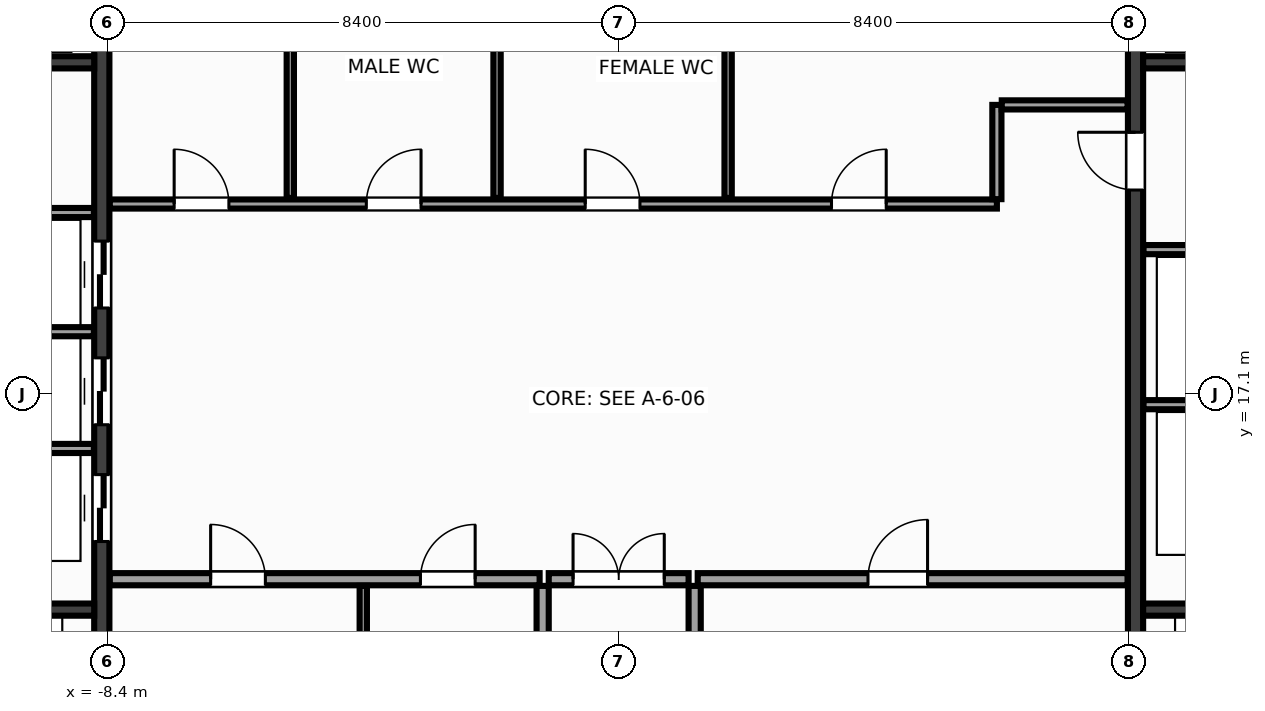
"""IFC4 building model, lengths in metres.
Left out: names, types, materials, properties, quantities, classifications, styles, units other than length and angle.
Written with IfcOpenShell. Run it as: python <this file> out.ifc"""

import sys

from ifc_helpers import new_model, si_unit, direction, frame, frame_2d, origin, place, context, subcontext, project, spatial, rectangle, extrude, source, transform, mapped, element, fill, save


model = new_model("IFC4")
c1 = context("Model", 3, precision=1e-05, world=origin(), true_north=direction((0.0, 1.0)))
c2 = subcontext(c1, "Body", "Model", "MODEL_VIEW")
j1 = project(units=[si_unit("LENGTHUNIT", "METRE"), si_unit("PLANEANGLEUNIT", "RADIAN")], contexts=[c1])
p1 = place(None, origin())
s1 = spatial("IfcSite", under=j1, at=p1, CompositionType="ELEMENT")
p2 = place(p1, origin())
s2 = spatial("IfcBuilding", under=s1, at=p2, CompositionType="ELEMENT")
p3 = place(p2, frame((0.0, 0.0, 232.4)))
s3 = spatial("IfcBuildingStorey", under=s2, at=p3, CompositionType="ELEMENT", Elevation=232.4)
m1 = source(origin(), c2, "Body", "SweptSolid", [
    extrude(rectangle(XDim=13.1, YDim=0.25, at=frame_2d((6.55, 0.0))), origin(), (0.0, 0.0, 1.0), 3.6),
])
p4 = place(p3, frame((-8.5, 10.45, 0.0), z_axis=(0.0, 0.0, 1.0), x_axis=(0.0, 1.0, 0.0)))
e1 = element("IfcWall", 1, at=p4, inside=s3, PredefinedType="SHEAR", context=c2, shape_type="MappedRepresentation", body=[
    mapped(m1, transform((0.0, 0.0, 0.0), x_axis=(1.0, 0.0, 0.0), y_axis=(0.0, 1.0, 0.0), z_axis=(0.0, 0.0, 1.0), scale=1.0)),
])
p5 = place(p4, frame((4.22, 0.0, 0.0)))
e2 = element("IfcOpeningElement", 2, at=p5, cuts=e1, PredefinedType="OPENING", context=c2, shape_type="SweptSolid", body=[
    extrude(rectangle(XDim=1.1, YDim=2.15, at=frame_2d((0.55, 1.075))), frame((0.0, 0.137, 0.0), z_axis=(0.0, -1.0, 0.0), x_axis=(1.0, 0.0, 0.0)), (0.0, 0.0, 1.0), 0.274),
])
p6 = place(p4, frame((6.14, 0.0, 0.0)))
e3 = element("IfcOpeningElement", 3, at=p6, cuts=e1, PredefinedType="OPENING", context=c2, shape_type="SweptSolid", body=[
    extrude(rectangle(XDim=1.1, YDim=2.15, at=frame_2d((0.55, 1.075))), frame((0.0, 0.137, 0.0), z_axis=(0.0, -1.0, 0.0), x_axis=(1.0, 0.0, 0.0)), (0.0, 0.0, 1.0), 0.274),
])
p7 = place(p4, frame((8.06, 0.0, 0.0)))
e4 = element("IfcOpeningElement", 4, at=p7, cuts=e1, PredefinedType="OPENING", context=c2, shape_type="SweptSolid", body=[
    extrude(rectangle(XDim=1.1, YDim=2.15, at=frame_2d((0.55, 1.075))), frame((0.0, 0.137, 0.0), z_axis=(0.0, -1.0, 0.0), x_axis=(1.0, 0.0, 0.0)), (0.0, 0.0, 1.0), 0.274),
])
p8 = place(p3, frame((8.5, 10.45, 0.0), z_axis=(0.0, 0.0, 1.0), x_axis=(0.0, 1.0, 0.0)))
e5 = element("IfcWall", 5, at=p8, inside=s3, PredefinedType="SHEAR", context=c2, shape_type="MappedRepresentation", body=[
    mapped(m1, transform((0.0, 0.0, 0.0), x_axis=(1.0, 0.0, 0.0), y_axis=(0.0, 1.0, 0.0), z_axis=(0.0, 0.0, 1.0), scale=1.0)),
])
p9 = place(p8, frame((10.0, 0.0, 0.0)))
e6 = element("IfcOpeningElement", 6, at=p9, cuts=e5, PredefinedType="OPENING", context=c2, shape_type="SweptSolid", body=[
    extrude(rectangle(XDim=0.95, YDim=2.15, at=frame_2d((0.475, 1.075))), frame((0.0, 0.137, 0.0), z_axis=(0.0, -1.0, 0.0), x_axis=(1.0, 0.0, 0.0)), (0.0, 0.0, 1.0), 0.274),
])
m2 = source(origin(), c2, "Body", "SweptSolid", [
    extrude(rectangle(XDim=2.825, YDim=0.2, at=frame_2d((1.413, 0.0))), origin(), (0.0, 0.0, 1.0), 3.6),
])
for number, where, z_axis, x_axis in (
    (7, (-11.45, 13.55, 0.0), (0.0, 0.0, 1.0), (1.0, 0.0, 0.0)),
    (8, (8.625, 13.55, 0.0), (0.0, 0.0, 1.0), (1.0, 0.0, 0.0)),
):
    element("IfcWall", number, at=place(p3, frame(where, z_axis=z_axis, x_axis=x_axis)), inside=s3, PredefinedType="SHEAR", context=c2, shape_type="MappedRepresentation", body=[
        mapped(m2, transform((0.0, 0.0, 0.0), x_axis=(1.0, 0.0, 0.0), y_axis=(0.0, 1.0, 0.0), z_axis=(0.0, 0.0, 1.0), scale=1.0)),
    ])
m3 = source(origin(), c2, "Body", "SweptSolid", [
    extrude(rectangle(XDim=3.02, YDim=0.2, at=frame_2d((1.51, 0.0))), origin(), (0.0, 0.0, 1.0), 3.6),
])
for number, where, z_axis, x_axis in (
    (9, (-11.645, 22.55, 0.0), (0.0, 0.0, 1.0), (1.0, 0.0, 0.0)),
    (10, (8.625, 22.55, 0.0), (0.0, 0.0, 1.0), (1.0, 0.0, 0.0)),
):
    element("IfcWall", number, at=place(p3, frame(where, z_axis=z_axis, x_axis=x_axis)), inside=s3, PredefinedType="SHEAR", context=c2, shape_type="MappedRepresentation", body=[
        mapped(m3, transform((0.0, 0.0, 0.0), x_axis=(1.0, 0.0, 0.0), y_axis=(0.0, 1.0, 0.0), z_axis=(0.0, 0.0, 1.0), scale=1.0)),
    ])
m4 = source(origin(), c2, "Body", "SweptSolid", [
    extrude(rectangle(XDim=3.01, YDim=0.15, at=frame_2d((1.505, 0.0))), origin(), (0.0, 0.0, 1.0), 3.37),
])
for number, where, z_axis, x_axis in (
    (11, (-11.64, 16.2, 0.0), (0.0, 0.0, 1.0), (1.0, 0.0, 0.0)),
    (12, (-11.64, 18.12, 0.0), (0.0, 0.0, 1.0), (1.0, 0.0, 0.0)),
    (13, (-11.64, 20.08, 0.0), (0.0, 0.0, 1.0), (1.0, 0.0, 0.0)),
    (14, (8.63, 16.92, 0.0), (0.0, 0.0, 1.0), (1.0, 0.0, 0.0)),
    (15, (8.63, 19.47, 0.0), (0.0, 0.0, 1.0), (1.0, 0.0, 0.0)),
):
    element("IfcWall", number, at=place(p3, frame(where, z_axis=z_axis, x_axis=x_axis)), inside=s3, PredefinedType="PARTITIONING", context=c2, shape_type="MappedRepresentation", body=[
        mapped(m4, transform((0.0, 0.0, 0.0), x_axis=(1.0, 0.0, 0.0), y_axis=(0.0, 1.0, 0.0), z_axis=(0.0, 0.0, 1.0), scale=1.0)),
    ])
m5 = source(origin(), c2, "Body", "SweptSolid", [
    extrude(rectangle(XDim=7.07, YDim=0.2, at=frame_2d((3.535, 0.0))), origin(), (0.0, 0.0, 1.0), 3.37),
])
p10 = place(p3, frame((-8.37, 14.05, 0.0), z_axis=(0.0, 0.0, 1.0), x_axis=(1.0, 0.0, 0.0)))
e16 = element("IfcWall", 16, at=p10, inside=s3, PredefinedType="PARTITIONING", context=c2, shape_type="MappedRepresentation", body=[
    mapped(m5, transform((0.0, 0.0, 0.0), x_axis=(1.0, 0.0, 0.0), y_axis=(0.0, 1.0, 0.0), z_axis=(0.0, 0.0, 1.0), scale=1.0)),
])
p11 = place(p10, frame((1.66, 0.0, 0.0)))
e17 = element("IfcOpeningElement", 17, at=p11, cuts=e16, PredefinedType="OPENING", context=c2, shape_type="SweptSolid", body=[
    extrude(rectangle(XDim=0.9, YDim=2.15, at=frame_2d((0.45, 1.075))), frame((0.0, 0.112, 0.0), z_axis=(0.0, -1.0, 0.0), x_axis=(1.0, 0.0, 0.0)), (0.0, 0.0, 1.0), 0.224),
])
p12 = place(p10, frame((5.11, 0.0, 0.0)))
e18 = element("IfcOpeningElement", 18, at=p12, cuts=e16, PredefinedType="OPENING", context=c2, shape_type="SweptSolid", body=[
    extrude(rectangle(XDim=0.9, YDim=2.15, at=frame_2d((0.45, 1.075))), frame((0.0, 0.112, 0.0), z_axis=(0.0, -1.0, 0.0), x_axis=(1.0, 0.0, 0.0)), (0.0, 0.0, 1.0), 0.224),
])
p13 = place(p3, frame((1.3, 14.05, 0.0), z_axis=(0.0, 0.0, 1.0), x_axis=(1.0, 0.0, 0.0)))
e19 = element("IfcWall", 19, at=p13, inside=s3, PredefinedType="PARTITIONING", context=c2, shape_type="MappedRepresentation", body=[
    mapped(m5, transform((0.0, 0.0, 0.0), x_axis=(1.0, 0.0, 0.0), y_axis=(0.0, 1.0, 0.0), z_axis=(0.0, 0.0, 1.0), scale=1.0)),
])
p14 = place(p13, frame((2.8, 0.0, 0.0)))
e20 = element("IfcOpeningElement", 20, at=p14, cuts=e19, PredefinedType="OPENING", context=c2, shape_type="SweptSolid", body=[
    extrude(rectangle(XDim=0.98, YDim=2.15, at=frame_2d((0.49, 1.075))), frame((0.0, 0.112, 0.0), z_axis=(0.0, -1.0, 0.0), x_axis=(1.0, 0.0, 0.0)), (0.0, 0.0, 1.0), 0.224),
])
m6 = source(origin(), c2, "Body", "SweptSolid", [
    extrude(rectangle(XDim=3.49, YDim=0.2, at=frame_2d((1.745, 0.0))), origin(), (0.0, 0.0, 1.0), 3.37),
])
for number, where, z_axis, x_axis in (
    (21, (-1.25, 10.45, 0.0), (0.0, 0.0, 1.0), (0.0, 1.0, 0.0)),
    (22, (1.25, 10.45, 0.0), (0.0, 0.0, 1.0), (0.0, 1.0, 0.0)),
):
    element("IfcWall", number, at=place(p3, frame(where, z_axis=z_axis, x_axis=x_axis)), inside=s3, PredefinedType="PARTITIONING", context=c2, shape_type="MappedRepresentation", body=[
        mapped(m6, transform((0.0, 0.0, 0.0), x_axis=(1.0, 0.0, 0.0), y_axis=(0.0, 1.0, 0.0), z_axis=(0.0, 0.0, 1.0), scale=1.0)),
    ])
m7 = source(origin(), c2, "Body", "SweptSolid", [
    extrude(rectangle(XDim=2.3, YDim=0.2, at=frame_2d((1.15, 0.0))), origin(), (0.0, 0.0, 1.0), 3.37),
])
p15 = place(p3, frame((-1.15, 14.05, 0.0), z_axis=(0.0, 0.0, 1.0), x_axis=(1.0, 0.0, 0.0)))
e23 = element("IfcWall", 23, at=p15, inside=s3, PredefinedType="PARTITIONING", context=c2, shape_type="MappedRepresentation", body=[
    mapped(m7, transform((0.0, 0.0, 0.0), x_axis=(1.0, 0.0, 0.0), y_axis=(0.0, 1.0, 0.0), z_axis=(0.0, 0.0, 1.0), scale=1.0)),
])
p16 = place(p15, frame((0.4, 0.0, 0.0)))
e24 = element("IfcOpeningElement", 24, at=p16, cuts=e23, PredefinedType="OPENING", context=c2, shape_type="SweptSolid", body=[
    extrude(rectangle(XDim=1.5, YDim=2.2, at=frame_2d((0.75, 1.1))), frame((0.0, 0.112, 0.0), z_axis=(0.0, -1.0, 0.0), x_axis=(1.0, 0.0, 0.0)), (0.0, 0.0, 1.0), 0.224),
])
m8 = source(origin(), c2, "Body", "SweptSolid", [
    extrude(rectangle(XDim=14.59, YDim=0.15, at=frame_2d((7.295, 0.0))), origin(), (0.0, 0.0, 1.0), 3.37),
])
p17 = place(p3, frame((-8.37, 20.22, 0.0), z_axis=(0.0, 0.0, 1.0), x_axis=(1.0, 0.0, 0.0)))
e25 = element("IfcWall", 25, at=p17, inside=s3, PredefinedType="PARTITIONING", context=c2, shape_type="MappedRepresentation", body=[
    mapped(m8, transform((0.0, 0.0, 0.0), x_axis=(1.0, 0.0, 0.0), y_axis=(0.0, 1.0, 0.0), z_axis=(0.0, 0.0, 1.0), scale=1.0)),
])
p18 = place(p17, frame((1.06, 0.0, 0.0)))
e26 = element("IfcOpeningElement", 26, at=p18, cuts=e25, PredefinedType="OPENING", context=c2, shape_type="SweptSolid", body=[
    extrude(rectangle(XDim=0.9, YDim=2.15, at=frame_2d((0.45, 1.075))), frame((0.0, 0.087, 0.0), z_axis=(0.0, -1.0, 0.0), x_axis=(1.0, 0.0, 0.0)), (0.0, 0.0, 1.0), 0.174),
])
p19 = place(p17, frame((4.22, 0.0, 0.0)))
e27 = element("IfcOpeningElement", 27, at=p19, cuts=e25, PredefinedType="OPENING", context=c2, shape_type="SweptSolid", body=[
    extrude(rectangle(XDim=0.9, YDim=2.15, at=frame_2d((0.45, 1.075))), frame((0.0, 0.087, 0.0), z_axis=(0.0, -1.0, 0.0), x_axis=(1.0, 0.0, 0.0)), (0.0, 0.0, 1.0), 0.174),
])
p20 = place(p17, frame((7.82, 0.0, 0.0)))
e28 = element("IfcOpeningElement", 28, at=p20, cuts=e25, PredefinedType="OPENING", context=c2, shape_type="SweptSolid", body=[
    extrude(rectangle(XDim=0.9, YDim=2.15, at=frame_2d((0.45, 1.075))), frame((0.0, 0.087, 0.0), z_axis=(0.0, -1.0, 0.0), x_axis=(1.0, 0.0, 0.0)), (0.0, 0.0, 1.0), 0.174),
])
p21 = place(p17, frame((11.87, 0.0, 0.0)))
e29 = element("IfcOpeningElement", 29, at=p21, cuts=e25, PredefinedType="OPENING", context=c2, shape_type="SweptSolid", body=[
    extrude(rectangle(XDim=0.9, YDim=2.15, at=frame_2d((0.45, 1.075))), frame((0.0, 0.087, 0.0), z_axis=(0.0, -1.0, 0.0), x_axis=(1.0, 0.0, 0.0)), (0.0, 0.0, 1.0), 0.174),
])
m9 = source(origin(), c2, "Body", "SweptSolid", [
    extrude(rectangle(XDim=1.55, YDim=0.15, at=frame_2d((0.775, 0.0))), origin(), (0.0, 0.0, 1.0), 3.37),
])
p22 = place(p3, frame((6.22, 20.3, 0.0), z_axis=(0.0, 0.0, 1.0), x_axis=(0.0, 1.0, 0.0)))
e30 = element("IfcWall", 30, at=p22, inside=s3, PredefinedType="PARTITIONING", context=c2, shape_type="MappedRepresentation", body=[
    mapped(m9, transform((0.0, 0.0, 0.0), x_axis=(1.0, 0.0, 0.0), y_axis=(0.0, 1.0, 0.0), z_axis=(0.0, 0.0, 1.0), scale=1.0)),
])
m10 = source(origin(), c2, "Body", "SweptSolid", [
    extrude(rectangle(XDim=2.07, YDim=0.15, at=frame_2d((1.035, 0.0))), origin(), (0.0, 0.0, 1.0), 3.37),
])
p23 = place(p3, frame((6.3, 21.85, 0.0), z_axis=(0.0, 0.0, 1.0), x_axis=(1.0, 0.0, 0.0)))
e31 = element("IfcWall", 31, at=p23, inside=s3, PredefinedType="PARTITIONING", context=c2, shape_type="MappedRepresentation", body=[
    mapped(m10, transform((0.0, 0.0, 0.0), x_axis=(1.0, 0.0, 0.0), y_axis=(0.0, 1.0, 0.0), z_axis=(0.0, 0.0, 1.0), scale=1.0)),
])
m11 = source(origin(), c2, "Body", "SweptSolid", [
    extrude(rectangle(XDim=3.49, YDim=0.12, at=frame_2d((1.745, 0.0))), origin(), (0.0, 0.0, 1.0), 3.37),
])
p24 = place(p3, frame((-4.2, 10.45, 0.0), z_axis=(0.0, 0.0, 1.0), x_axis=(0.0, 1.0, 0.0)))
e32 = element("IfcWall", 32, at=p24, inside=s3, PredefinedType="PARTITIONING", context=c2, shape_type="MappedRepresentation", body=[
    mapped(m11, transform((0.0, 0.0, 0.0), x_axis=(1.0, 0.0, 0.0), y_axis=(0.0, 1.0, 0.0), z_axis=(0.0, 0.0, 1.0), scale=1.0)),
])
m12 = source(origin(), c2, "Body", "SweptSolid", [
    extrude(rectangle(XDim=3.19, YDim=0.12, at=frame_2d((1.595, 0.0))), origin(), (0.0, 0.0, 1.0), 3.37),
])
for number, where, z_axis, x_axis in (
    (33, (-5.4, 20.32, 0.0), (0.0, 0.0, 1.0), (0.0, 1.0, 0.0)),
    (34, (-2.0, 20.32, 0.0), (0.0, 0.0, 1.0), (0.0, 1.0, 0.0)),
    (35, (1.8, 20.32, 0.0), (0.0, 0.0, 1.0), (0.0, 1.0, 0.0)),
):
    element("IfcWall", number, at=place(p3, frame(where, z_axis=z_axis, x_axis=x_axis)), inside=s3, PredefinedType="PARTITIONING", context=c2, shape_type="MappedRepresentation", body=[
        mapped(m12, transform((0.0, 0.0, 0.0), x_axis=(1.0, 0.0, 0.0), y_axis=(0.0, 1.0, 0.0), z_axis=(0.0, 0.0, 1.0), scale=1.0)),
    ])
m13 = source(origin(), c2, "Body", "SweptSolid", [
    extrude(rectangle(XDim=1.1, YDim=2.15, at=frame_2d((0.55, 1.075))), frame((0.0, 0.025, 0.0), z_axis=(0.0, -1.0, 0.0), x_axis=(1.0, 0.0, 0.0)), (0.0, 0.0, 1.0), 0.05),
])
p25 = place(p5, origin())
e36 = element("IfcDoor", 36, at=p25, inside=s3, OperationType="DOUBLE_DOOR_SLIDING", PredefinedType="DOOR", context=c2, shape_type="MappedRepresentation", body=[
    mapped(m13, transform((0.0, 0.0, 0.0), x_axis=(1.0, 0.0, 0.0), y_axis=(0.0, 1.0, 0.0), z_axis=(0.0, 0.0, 1.0), scale=1.0)),
])
fill(e2, e36)
p26 = place(p6, origin())
e37 = element("IfcDoor", 37, at=p26, inside=s3, OperationType="DOUBLE_DOOR_SLIDING", PredefinedType="DOOR", context=c2, shape_type="MappedRepresentation", body=[
    mapped(m13, transform((0.0, 0.0, 0.0), x_axis=(1.0, 0.0, 0.0), y_axis=(0.0, 1.0, 0.0), z_axis=(0.0, 0.0, 1.0), scale=1.0)),
])
fill(e3, e37)
p27 = place(p7, origin())
e38 = element("IfcDoor", 38, at=p27, inside=s3, OperationType="DOUBLE_DOOR_SLIDING", PredefinedType="DOOR", context=c2, shape_type="MappedRepresentation", body=[
    mapped(m13, transform((0.0, 0.0, 0.0), x_axis=(1.0, 0.0, 0.0), y_axis=(0.0, 1.0, 0.0), z_axis=(0.0, 0.0, 1.0), scale=1.0)),
])
fill(e4, e38)
m14 = source(origin(), c2, "Body", "SweptSolid", [
    extrude(rectangle(XDim=0.95, YDim=2.15, at=frame_2d((0.475, 1.075))), frame((0.0, 0.025, 0.0), z_axis=(0.0, -1.0, 0.0), x_axis=(1.0, 0.0, 0.0)), (0.0, 0.0, 1.0), 0.05),
])
p28 = place(p9, origin())
e39 = element("IfcDoor", 39, at=p28, inside=s3, OperationType="SINGLE_SWING_RIGHT", PredefinedType="DOOR", context=c2, shape_type="MappedRepresentation", body=[
    mapped(m14, transform((0.0, 0.0, 0.0), x_axis=(1.0, 0.0, 0.0), y_axis=(0.0, 1.0, 0.0), z_axis=(0.0, 0.0, 1.0), scale=1.0)),
])
fill(e6, e39)
m15 = source(origin(), c2, "Body", "SweptSolid", [
    extrude(rectangle(XDim=0.9, YDim=2.15, at=frame_2d((0.45, 1.075))), frame((0.0, 0.025, 0.0), z_axis=(0.0, -1.0, 0.0), x_axis=(1.0, 0.0, 0.0)), (0.0, 0.0, 1.0), 0.05),
])
p29 = place(p11, origin())
e40 = element("IfcDoor", 40, at=p29, inside=s3, OperationType="SINGLE_SWING_LEFT", PredefinedType="DOOR", context=c2, shape_type="MappedRepresentation", body=[
    mapped(m15, transform((0.0, 0.0, 0.0), x_axis=(1.0, 0.0, 0.0), y_axis=(0.0, 1.0, 0.0), z_axis=(0.0, 0.0, 1.0), scale=1.0)),
])
fill(e17, e40)
p30 = place(p12, origin())
e41 = element("IfcDoor", 41, at=p30, inside=s3, OperationType="SINGLE_SWING_RIGHT", PredefinedType="DOOR", context=c2, shape_type="MappedRepresentation", body=[
    mapped(m15, transform((0.0, 0.0, 0.0), x_axis=(1.0, 0.0, 0.0), y_axis=(0.0, 1.0, 0.0), z_axis=(0.0, 0.0, 1.0), scale=1.0)),
])
fill(e18, e41)
m16 = source(origin(), c2, "Body", "SweptSolid", [
    extrude(rectangle(XDim=0.98, YDim=2.15, at=frame_2d((0.49, 1.075))), frame((0.0, 0.025, 0.0), z_axis=(0.0, -1.0, 0.0), x_axis=(1.0, 0.0, 0.0)), (0.0, 0.0, 1.0), 0.05),
])
p31 = place(p14, origin())
e42 = element("IfcDoor", 42, at=p31, inside=s3, OperationType="SINGLE_SWING_RIGHT", PredefinedType="DOOR", context=c2, shape_type="MappedRepresentation", body=[
    mapped(m16, transform((0.0, 0.0, 0.0), x_axis=(1.0, 0.0, 0.0), y_axis=(0.0, 1.0, 0.0), z_axis=(0.0, 0.0, 1.0), scale=1.0)),
])
fill(e20, e42)
m17 = source(origin(), c2, "Body", "SweptSolid", [
    extrude(rectangle(XDim=1.5, YDim=2.2, at=frame_2d((0.75, 1.1))), frame((0.0, 0.025, 0.0), z_axis=(0.0, -1.0, 0.0), x_axis=(1.0, 0.0, 0.0)), (0.0, 0.0, 1.0), 0.05),
])
p32 = place(p16, origin())
e43 = element("IfcDoor", 43, at=p32, inside=s3, OperationType="DOUBLE_DOOR_SINGLE_SWING", PredefinedType="DOOR", context=c2, shape_type="MappedRepresentation", body=[
    mapped(m17, transform((0.0, 0.0, 0.0), x_axis=(1.0, 0.0, 0.0), y_axis=(0.0, 1.0, 0.0), z_axis=(0.0, 0.0, 1.0), scale=1.0)),
])
fill(e24, e43)
p33 = place(p18, origin())
e44 = element("IfcDoor", 44, at=p33, inside=s3, OperationType="SINGLE_SWING_LEFT", PredefinedType="DOOR", context=c2, shape_type="MappedRepresentation", body=[
    mapped(m15, transform((0.0, 0.0, 0.0), x_axis=(1.0, 0.0, 0.0), y_axis=(0.0, 1.0, 0.0), z_axis=(0.0, 0.0, 1.0), scale=1.0)),
])
fill(e26, e44)
p34 = place(p19, origin())
e45 = element("IfcDoor", 45, at=p34, inside=s3, OperationType="SINGLE_SWING_RIGHT", PredefinedType="DOOR", context=c2, shape_type="MappedRepresentation", body=[
    mapped(m15, transform((0.0, 0.0, 0.0), x_axis=(1.0, 0.0, 0.0), y_axis=(0.0, 1.0, 0.0), z_axis=(0.0, 0.0, 1.0), scale=1.0)),
])
fill(e27, e45)
p35 = place(p20, origin())
e46 = element("IfcDoor", 46, at=p35, inside=s3, OperationType="SINGLE_SWING_LEFT", PredefinedType="DOOR", context=c2, shape_type="MappedRepresentation", body=[
    mapped(m15, transform((0.0, 0.0, 0.0), x_axis=(1.0, 0.0, 0.0), y_axis=(0.0, 1.0, 0.0), z_axis=(0.0, 0.0, 1.0), scale=1.0)),
])
fill(e28, e46)
p36 = place(p21, origin())
e47 = element("IfcDoor", 47, at=p36, inside=s3, OperationType="SINGLE_SWING_RIGHT", PredefinedType="DOOR", context=c2, shape_type="MappedRepresentation", body=[
    mapped(m15, transform((0.0, 0.0, 0.0), x_axis=(1.0, 0.0, 0.0), y_axis=(0.0, 1.0, 0.0), z_axis=(0.0, 0.0, 1.0), scale=1.0)),
])
fill(e29, e47)
save(model, sys.argv[1])
